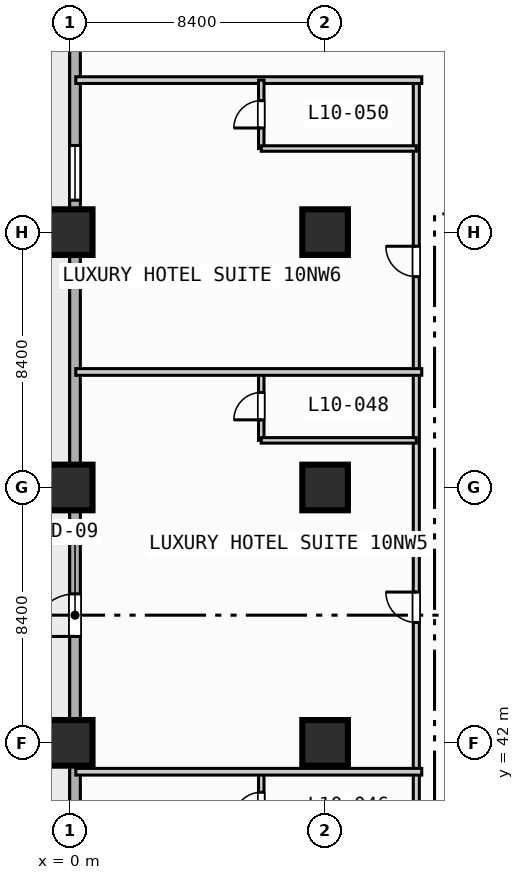
"""IFC4 building model, lengths in metres.
Left out: names, types, materials, properties, quantities, classifications, styles, units other than length and angle.
Written with IfcOpenShell. Run it as: python <this file> out.ifc"""

import sys

from ifc_helpers import new_model, si_unit, direction, frame, frame_2d, origin, origin_2d, place, context, subcontext, project, spatial, rectangle, extrude, element, fill, save


model = new_model("IFC4")
c1 = context("Model", 3, precision=1e-05, world=origin(), true_north=direction((0.0, 1.0)))
c2 = subcontext(c1, "Body", "Model", "MODEL_VIEW")
j1 = project(units=[si_unit("LENGTHUNIT", "METRE"), si_unit("PLANEANGLEUNIT", "RADIAN")], contexts=[c1])
p1 = place(None, origin())
s1 = spatial("IfcSite", under=j1, at=p1, CompositionType="ELEMENT")
p2 = place(p1, origin())
s2 = spatial("IfcBuilding", under=s1, at=p2, CompositionType="ELEMENT")
p3 = place(p2, frame((0.0, 0.0, 47.2)))
s3 = spatial("IfcBuildingStorey", under=s2, at=p3, CompositionType="ELEMENT", Elevation=47.2)
for number, where, z_axis, x_axis in (
    (1, (0.0, 42.0, 0.0), (0.0, 0.0, 1.0), (1.0, 0.0, 0.0)),
    (2, (0.0, 50.4, 0.0), (0.0, 0.0, 1.0), (1.0, 0.0, 0.0)),
    (3, (0.0, 58.8, 0.0), (0.0, 0.0, 1.0), (1.0, 0.0, 0.0)),
    (4, (8.4, 42.0, 0.0), (0.0, 0.0, 1.0), (1.0, 0.0, 0.0)),
    (5, (8.4, 50.4, 0.0), (0.0, 0.0, 1.0), (1.0, 0.0, 0.0)),
    (6, (8.4, 58.8, 0.0), (0.0, 0.0, 1.0), (1.0, 0.0, 0.0)),
):
    element("IfcColumn", number, at=place(p3, frame(where, z_axis=z_axis, x_axis=x_axis)), inside=s3, PredefinedType="COLUMN", context=c2, shape_type="SweptSolid", body=[
        extrude(rectangle(XDim=1.5, YDim=1.5, at=origin_2d()), origin(), (0.0, 0.0, 1.0), 3.8),
    ])
p4 = place(p3, frame((0.175, 3.175, 0.0), z_axis=(0.0, 0.0, 1.0), x_axis=(0.0, 1.0, 0.0)))
e7 = element("IfcWall", 7, at=p4, inside=s3, PredefinedType="STANDARD", context=c2, shape_type="SweptSolid", body=[
    extrude(rectangle(XDim=86.05, YDim=0.35, at=frame_2d((43.025, 0.0))), origin(), (0.0, 0.0, 1.0), 3.55),
])
p5 = place(p4, frame((42.325, 0.0, 0.0)))
e8 = element("IfcOpeningElement", 8, at=p5, cuts=e7, PredefinedType="OPENING", context=c2, shape_type="SweptSolid", body=[
    extrude(rectangle(XDim=1.4, YDim=2.2, at=frame_2d((0.7, 1.1))), frame((0.0, 0.185, 0.0), z_axis=(0.0, -1.0, 0.0), x_axis=(1.0, 0.0, 0.0)), (0.0, 0.0, 1.0), 0.37),
])
p6 = place(p4, frame((8.325, 0.0, 0.85)))
e9 = element("IfcOpeningElement", 9, at=p6, cuts=e7, PredefinedType="OPENING", context=c2, shape_type="SweptSolid", body=[
    extrude(rectangle(XDim=2.2, YDim=1.8, at=frame_2d((1.1, 0.9))), frame((0.0, 0.185, 0.0), z_axis=(0.0, -1.0, 0.0), x_axis=(1.0, 0.0, 0.0)), (0.0, 0.0, 1.0), 0.37),
])
p7 = place(p4, frame((16.725, 0.0, 0.85)))
e10 = element("IfcOpeningElement", 10, at=p7, cuts=e7, PredefinedType="OPENING", context=c2, shape_type="SweptSolid", body=[
    extrude(rectangle(XDim=2.2, YDim=1.8, at=frame_2d((1.1, 0.9))), frame((0.0, 0.185, 0.0), z_axis=(0.0, -1.0, 0.0), x_axis=(1.0, 0.0, 0.0)), (0.0, 0.0, 1.0), 0.37),
])
p8 = place(p4, frame((25.125, 0.0, 0.85)))
e11 = element("IfcOpeningElement", 11, at=p8, cuts=e7, PredefinedType="OPENING", context=c2, shape_type="SweptSolid", body=[
    extrude(rectangle(XDim=2.2, YDim=1.8, at=frame_2d((1.1, 0.9))), frame((0.0, 0.185, 0.0), z_axis=(0.0, -1.0, 0.0), x_axis=(1.0, 0.0, 0.0)), (0.0, 0.0, 1.0), 0.37),
])
p9 = place(p4, frame((33.525, 0.0, 0.85)))
e12 = element("IfcOpeningElement", 12, at=p9, cuts=e7, PredefinedType="OPENING", context=c2, shape_type="SweptSolid", body=[
    extrude(rectangle(XDim=2.2, YDim=1.8, at=frame_2d((1.1, 0.9))), frame((0.0, 0.185, 0.0), z_axis=(0.0, -1.0, 0.0), x_axis=(1.0, 0.0, 0.0)), (0.0, 0.0, 1.0), 0.37),
])
p10 = place(p4, frame((56.675, 0.0, 0.85)))
e13 = element("IfcOpeningElement", 13, at=p10, cuts=e7, PredefinedType="OPENING", context=c2, shape_type="SweptSolid", body=[
    extrude(rectangle(XDim=1.8, YDim=1.8, at=frame_2d((0.9, 0.9))), frame((0.0, 0.185, 0.0), z_axis=(0.0, -1.0, 0.0), x_axis=(1.0, 0.0, 0.0)), (0.0, 0.0, 1.0), 0.37),
])
p11 = place(p3, frame((11.4, 3.4, 0.0), z_axis=(0.0, 0.0, 1.0), x_axis=(0.0, 1.0, 0.0)))
e14 = element("IfcWall", 14, at=p11, inside=s3, PredefinedType="PARTITIONING", context=c2, shape_type="SweptSolid", body=[
    extrude(rectangle(XDim=60.4, YDim=0.2, at=frame_2d((30.2, 0.0))), origin(), (0.0, 0.0, 1.0), 3.55),
])
p12 = place(p11, frame((6.065, 0.0, 0.0)))
e15 = element("IfcOpeningElement", 15, at=p12, cuts=e14, PredefinedType="OPENING", context=c2, shape_type="SweptSolid", body=[
    extrude(rectangle(XDim=1.0, YDim=2.15, at=frame_2d((0.5, 1.075))), frame((0.0, 0.11, 0.0), z_axis=(0.0, -1.0, 0.0), x_axis=(1.0, 0.0, 0.0)), (0.0, 0.0, 1.0), 0.22),
])
p13 = place(p11, frame((13.735, 0.0, 0.0)))
e16 = element("IfcOpeningElement", 16, at=p13, cuts=e14, PredefinedType="OPENING", context=c2, shape_type="SweptSolid", body=[
    extrude(rectangle(XDim=1.0, YDim=2.15, at=frame_2d((0.5, 1.075))), frame((0.0, 0.11, 0.0), z_axis=(0.0, -1.0, 0.0), x_axis=(1.0, 0.0, 0.0)), (0.0, 0.0, 1.0), 0.22),
])
p14 = place(p11, frame((22.96, 0.0, 0.0)))
e17 = element("IfcOpeningElement", 17, at=p14, cuts=e14, PredefinedType="OPENING", context=c2, shape_type="SweptSolid", body=[
    extrude(rectangle(XDim=1.0, YDim=2.15, at=frame_2d((0.5, 1.075))), frame((0.0, 0.11, 0.0), z_axis=(0.0, -1.0, 0.0), x_axis=(1.0, 0.0, 0.0)), (0.0, 0.0, 1.0), 0.22),
])
p15 = place(p11, frame((31.785, 0.0, 0.0)))
e18 = element("IfcOpeningElement", 18, at=p15, cuts=e14, PredefinedType="OPENING", context=c2, shape_type="SweptSolid", body=[
    extrude(rectangle(XDim=1.0, YDim=2.15, at=frame_2d((0.5, 1.075))), frame((0.0, 0.11, 0.0), z_axis=(0.0, -1.0, 0.0), x_axis=(1.0, 0.0, 0.0)), (0.0, 0.0, 1.0), 0.22),
])
p16 = place(p11, frame((42.56, 0.0, 0.0)))
e19 = element("IfcOpeningElement", 19, at=p16, cuts=e14, PredefinedType="OPENING", context=c2, shape_type="SweptSolid", body=[
    extrude(rectangle(XDim=1.0, YDim=2.15, at=frame_2d((0.5, 1.075))), frame((0.0, 0.11, 0.0), z_axis=(0.0, -1.0, 0.0), x_axis=(1.0, 0.0, 0.0)), (0.0, 0.0, 1.0), 0.22),
])
p17 = place(p11, frame((53.935, 0.0, 0.0)))
e20 = element("IfcOpeningElement", 20, at=p17, cuts=e14, PredefinedType="OPENING", context=c2, shape_type="SweptSolid", body=[
    extrude(rectangle(XDim=1.0, YDim=2.15, at=frame_2d((0.5, 1.075))), frame((0.0, 0.11, 0.0), z_axis=(0.0, -1.0, 0.0), x_axis=(1.0, 0.0, 0.0)), (0.0, 0.0, 1.0), 0.22),
])
p18 = place(p3, frame((6.3, 38.8, 0.0), z_axis=(0.0, 0.0, 1.0), x_axis=(0.0, 1.0, 0.0)))
e21 = element("IfcWall", 21, at=p18, inside=s3, PredefinedType="PLUMBINGWALL", context=c2, shape_type="SweptSolid", body=[
    extrude(rectangle(XDim=2.25, YDim=0.18, at=frame_2d((1.125, 0.0))), origin(), (0.0, 0.0, 1.0), 3.55),
])
p19 = place(p18, frame((0.675, 0.0, 0.0)))
e22 = element("IfcOpeningElement", 22, at=p19, cuts=e21, PredefinedType="OPENING", context=c2, shape_type="SweptSolid", body=[
    extrude(rectangle(XDim=0.9, YDim=2.1, at=frame_2d((0.45, 1.05))), frame((0.0, 0.1, 0.0), z_axis=(0.0, -1.0, 0.0), x_axis=(1.0, 0.0, 0.0)), (0.0, 0.0, 1.0), 0.2),
])
p20 = place(p3, frame((0.2, 41.05, 0.0), z_axis=(0.0, 0.0, 1.0), x_axis=(1.0, 0.0, 0.0)))
e23 = element("IfcWall", 23, at=p20, inside=s3, PredefinedType="PARTITIONING", context=c2, shape_type="SweptSolid", body=[
    extrude(rectangle(XDim=11.38, YDim=0.22, at=frame_2d((5.69, 0.0))), origin(), (0.0, 0.0, 1.0), 3.55),
])
p21 = place(p3, frame((6.3, 51.95, 0.0), z_axis=(0.0, 0.0, 1.0), x_axis=(0.0, 1.0, 0.0)))
e24 = element("IfcWall", 24, at=p21, inside=s3, PredefinedType="PLUMBINGWALL", context=c2, shape_type="SweptSolid", body=[
    extrude(rectangle(XDim=2.25, YDim=0.18, at=frame_2d((1.125, 0.0))), origin(), (0.0, 0.0, 1.0), 3.55),
])
p22 = place(p21, frame((0.675, 0.0, 0.0)))
e25 = element("IfcOpeningElement", 25, at=p22, cuts=e24, PredefinedType="OPENING", context=c2, shape_type="SweptSolid", body=[
    extrude(rectangle(XDim=0.9, YDim=2.1, at=frame_2d((0.45, 1.05))), frame((0.0, 0.1, 0.0), z_axis=(0.0, -1.0, 0.0), x_axis=(1.0, 0.0, 0.0)), (0.0, 0.0, 1.0), 0.2),
])
p23 = place(p3, frame((6.3, 51.95, 0.0), z_axis=(0.0, 0.0, 1.0), x_axis=(1.0, 0.0, 0.0)))
e26 = element("IfcWall", 26, at=p23, inside=s3, PredefinedType="PLUMBINGWALL", context=c2, shape_type="SweptSolid", body=[
    extrude(rectangle(XDim=5.1, YDim=0.18, at=frame_2d((2.55, 0.0))), origin(), (0.0, 0.0, 1.0), 3.55),
])
for number, where, z_axis, x_axis in (
    (27, (0.2, 54.2, 0.0), (0.0, 0.0, 1.0), (1.0, 0.0, 0.0)),
    (28, (0.2, 63.8, 0.0), (0.0, 0.0, 1.0), (1.0, 0.0, 0.0)),
):
    element("IfcWall", number, at=place(p3, frame(where, z_axis=z_axis, x_axis=x_axis)), inside=s3, PredefinedType="PARTITIONING", context=c2, shape_type="SweptSolid", body=[
        extrude(rectangle(XDim=11.38, YDim=0.22, at=frame_2d((5.69, 0.0))), origin(), (0.0, 0.0, 1.0), 3.55),
    ])
p24 = place(p3, frame((6.3, 61.55, 0.0), z_axis=(0.0, 0.0, 1.0), x_axis=(0.0, 1.0, 0.0)))
e29 = element("IfcWall", 29, at=p24, inside=s3, PredefinedType="PLUMBINGWALL", context=c2, shape_type="SweptSolid", body=[
    extrude(rectangle(XDim=2.25, YDim=0.18, at=frame_2d((1.125, 0.0))), origin(), (0.0, 0.0, 1.0), 3.55),
])
p25 = place(p24, frame((0.675, 0.0, 0.0)))
e30 = element("IfcOpeningElement", 30, at=p25, cuts=e29, PredefinedType="OPENING", context=c2, shape_type="SweptSolid", body=[
    extrude(rectangle(XDim=0.9, YDim=2.1, at=frame_2d((0.45, 1.05))), frame((0.0, 0.1, 0.0), z_axis=(0.0, -1.0, 0.0), x_axis=(1.0, 0.0, 0.0)), (0.0, 0.0, 1.0), 0.2),
])
p26 = place(p3, frame((6.3, 61.55, 0.0), z_axis=(0.0, 0.0, 1.0), x_axis=(1.0, 0.0, 0.0)))
e31 = element("IfcWall", 31, at=p26, inside=s3, PredefinedType="PLUMBINGWALL", context=c2, shape_type="SweptSolid", body=[
    extrude(rectangle(XDim=5.1, YDim=0.18, at=frame_2d((2.55, 0.0))), origin(), (0.0, 0.0, 1.0), 3.55),
])
p27 = place(p5, origin())
e32 = element("IfcDoor", 32, at=p27, inside=s3, OperationType="SINGLE_SWING_LEFT", PredefinedType="DOOR", context=c2, shape_type="SweptSolid", body=[
    extrude(rectangle(XDim=1.4, YDim=2.2, at=frame_2d((0.7, 1.1))), frame((0.0, 0.025, 0.0), z_axis=(0.0, -1.0, 0.0), x_axis=(1.0, 0.0, 0.0)), (0.0, 0.0, 1.0), 0.05),
])
fill(e8, e32)
p28 = place(p10, origin())
e33 = element("IfcWindow", 33, at=p28, inside=s3, PartitioningType="SINGLE_PANEL", PredefinedType="WINDOW", context=c2, shape_type="SweptSolid", body=[
    extrude(rectangle(XDim=1.8, YDim=1.8, at=frame_2d((0.9, 0.9))), frame((0.0, 0.03, 0.0), z_axis=(0.0, -1.0, 0.0), x_axis=(1.0, 0.0, 0.0)), (0.0, 0.0, 1.0), 0.06),
])
fill(e13, e33)
p29 = place(p16, origin())
e34 = element("IfcDoor", 34, at=p29, inside=s3, OperationType="SINGLE_SWING_RIGHT", PredefinedType="DOOR", context=c2, shape_type="SweptSolid", body=[
    extrude(rectangle(XDim=1.0, YDim=2.15, at=frame_2d((0.5, 1.075))), frame((0.0, 0.025, 0.0), z_axis=(0.0, -1.0, 0.0), x_axis=(1.0, 0.0, 0.0)), (0.0, 0.0, 1.0), 0.05),
])
fill(e19, e34)
p30 = place(p17, origin())
e35 = element("IfcDoor", 35, at=p30, inside=s3, OperationType="SINGLE_SWING_RIGHT", PredefinedType="DOOR", context=c2, shape_type="SweptSolid", body=[
    extrude(rectangle(XDim=1.0, YDim=2.15, at=frame_2d((0.5, 1.075))), frame((0.0, 0.025, 0.0), z_axis=(0.0, -1.0, 0.0), x_axis=(1.0, 0.0, 0.0)), (0.0, 0.0, 1.0), 0.05),
])
fill(e20, e35)
p31 = place(p19, origin())
e36 = element("IfcDoor", 36, at=p31, inside=s3, OperationType="SINGLE_SWING_LEFT", PredefinedType="DOOR", context=c2, shape_type="SweptSolid", body=[
    extrude(rectangle(XDim=0.9, YDim=2.1, at=frame_2d((0.45, 1.05))), frame((0.0, 0.025, 0.0), z_axis=(0.0, -1.0, 0.0), x_axis=(1.0, 0.0, 0.0)), (0.0, 0.0, 1.0), 0.05),
])
fill(e22, e36)
p32 = place(p22, origin())
e37 = element("IfcDoor", 37, at=p32, inside=s3, OperationType="SINGLE_SWING_LEFT", PredefinedType="DOOR", context=c2, shape_type="SweptSolid", body=[
    extrude(rectangle(XDim=0.9, YDim=2.1, at=frame_2d((0.45, 1.05))), frame((0.0, 0.025, 0.0), z_axis=(0.0, -1.0, 0.0), x_axis=(1.0, 0.0, 0.0)), (0.0, 0.0, 1.0), 0.05),
])
fill(e25, e37)
p33 = place(p25, origin())
e38 = element("IfcDoor", 38, at=p33, inside=s3, OperationType="SINGLE_SWING_LEFT", PredefinedType="DOOR", context=c2, shape_type="SweptSolid", body=[
    extrude(rectangle(XDim=0.9, YDim=2.1, at=frame_2d((0.45, 1.05))), frame((0.0, 0.025, 0.0), z_axis=(0.0, -1.0, 0.0), x_axis=(1.0, 0.0, 0.0)), (0.0, 0.0, 1.0), 0.05),
])
fill(e30, e38)
save(model, sys.argv[1])
